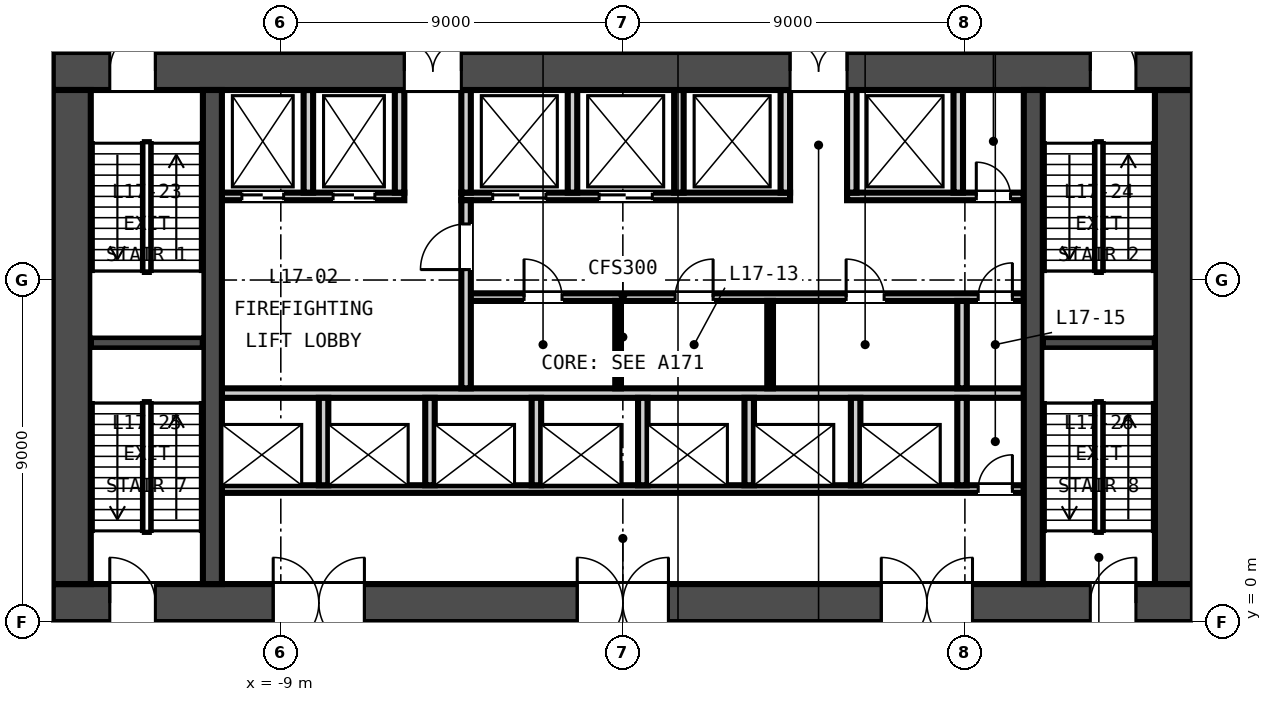
"""IFC4 building model, lengths in metres.
Left out: names, types, materials, properties, quantities, classifications, styles, units other than length and angle.
Written with IfcOpenShell. Run it as: python <this file> out.ifc"""

import sys

from ifc_helpers import new_model, si_unit, direction, frame, frame_2d, origin, place, context, subcontext, project, spatial, rectangle, extrude, element, fill, save


model = new_model("IFC4")
c1 = context("Model", 3, precision=1e-05, world=origin(), true_north=direction((0.0, 1.0)))
c2 = subcontext(c1, "Body", "Model", "MODEL_VIEW")
j1 = project(units=[si_unit("LENGTHUNIT", "METRE"), si_unit("PLANEANGLEUNIT", "RADIAN")], contexts=[c1])
p1 = place(None, origin())
s1 = spatial("IfcSite", under=j1, at=p1, CompositionType="ELEMENT")
p2 = place(p1, origin())
s2 = spatial("IfcBuilding", under=s1, at=p2, CompositionType="ELEMENT")
p3 = place(p2, frame((0.0, 0.0, 76.15)))
s3 = spatial("IfcBuildingStorey", under=s2, at=p3, CompositionType="ELEMENT", Elevation=76.15)
p4 = place(p3, frame((-15.0, 0.5, -0.3), z_axis=(0.0, 0.0, 1.0), x_axis=(1.0, 0.0, 0.0)))
e1 = element("IfcWall", 1, at=p4, inside=s3, PredefinedType="SOLIDWALL", context=c2, shape_type="SweptSolid", body=[
    extrude(rectangle(XDim=30.0, YDim=1.0, at=frame_2d((15.0, 0.0))), origin(), (0.0, 0.0, 1.0), 4.65),
])
p5 = place(p4, frame((5.8, 0.0, 0.3)))
e2 = element("IfcOpeningElement", 2, at=p5, cuts=e1, PredefinedType="OPENING", context=c2, shape_type="SweptSolid", body=[
    extrude(rectangle(XDim=2.4, YDim=2.4, at=frame_2d((1.2, 1.2))), frame((0.0, 0.51, 0.0), z_axis=(0.0, -1.0, 0.0), x_axis=(1.0, 0.0, 0.0)), (0.0, 0.0, 1.0), 1.02),
])
p6 = place(p4, frame((13.8, 0.0, 0.3)))
e3 = element("IfcOpeningElement", 3, at=p6, cuts=e1, PredefinedType="OPENING", context=c2, shape_type="SweptSolid", body=[
    extrude(rectangle(XDim=2.4, YDim=2.4, at=frame_2d((1.2, 1.2))), frame((0.0, 0.51, 0.0), z_axis=(0.0, -1.0, 0.0), x_axis=(1.0, 0.0, 0.0)), (0.0, 0.0, 1.0), 1.02),
])
p7 = place(p4, frame((21.8, 0.0, 0.3)))
e4 = element("IfcOpeningElement", 4, at=p7, cuts=e1, PredefinedType="OPENING", context=c2, shape_type="SweptSolid", body=[
    extrude(rectangle(XDim=2.4, YDim=2.4, at=frame_2d((1.2, 1.2))), frame((0.0, 0.51, 0.0), z_axis=(0.0, -1.0, 0.0), x_axis=(1.0, 0.0, 0.0)), (0.0, 0.0, 1.0), 1.02),
])
p8 = place(p4, frame((1.5, 0.0, 0.3)))
e5 = element("IfcOpeningElement", 5, at=p8, cuts=e1, PredefinedType="OPENING", context=c2, shape_type="SweptSolid", body=[
    extrude(rectangle(XDim=1.2, YDim=2.1, at=frame_2d((0.6, 1.05))), frame((0.0, 0.51, 0.0), z_axis=(0.0, -1.0, 0.0), x_axis=(1.0, 0.0, 0.0)), (0.0, 0.0, 1.0), 1.02),
])
p9 = place(p4, frame((27.3, 0.0, 0.3)))
e6 = element("IfcOpeningElement", 6, at=p9, cuts=e1, PredefinedType="OPENING", context=c2, shape_type="SweptSolid", body=[
    extrude(rectangle(XDim=1.2, YDim=2.1, at=frame_2d((0.6, 1.05))), frame((0.0, 0.51, 0.0), z_axis=(0.0, -1.0, 0.0), x_axis=(1.0, 0.0, 0.0)), (0.0, 0.0, 1.0), 1.02),
])
p10 = place(p3, frame((-15.0, 14.5, -0.3), z_axis=(0.0, 0.0, 1.0), x_axis=(1.0, 0.0, 0.0)))
e7 = element("IfcWall", 7, at=p10, inside=s3, PredefinedType="SOLIDWALL", context=c2, shape_type="SweptSolid", body=[
    extrude(rectangle(XDim=30.0, YDim=1.0, at=frame_2d((15.0, 0.0))), origin(), (0.0, 0.0, 1.0), 4.65),
])
p11 = place(p10, frame((9.25, 0.0, 0.3)))
e8 = element("IfcOpeningElement", 8, at=p11, cuts=e7, PredefinedType="OPENING", context=c2, shape_type="SweptSolid", body=[
    extrude(rectangle(XDim=1.5, YDim=2.1, at=frame_2d((0.75, 1.05))), frame((0.0, 0.51, 0.0), z_axis=(0.0, -1.0, 0.0), x_axis=(1.0, 0.0, 0.0)), (0.0, 0.0, 1.0), 1.02),
])
p12 = place(p10, frame((19.4, 0.0, 0.3)))
e9 = element("IfcOpeningElement", 9, at=p12, cuts=e7, PredefinedType="OPENING", context=c2, shape_type="SweptSolid", body=[
    extrude(rectangle(XDim=1.5, YDim=2.1, at=frame_2d((0.75, 1.05))), frame((0.0, 0.51, 0.0), z_axis=(0.0, -1.0, 0.0), x_axis=(1.0, 0.0, 0.0)), (0.0, 0.0, 1.0), 1.02),
])
p13 = place(p10, frame((1.5, 0.0, 0.3)))
e10 = element("IfcOpeningElement", 10, at=p13, cuts=e7, PredefinedType="OPENING", context=c2, shape_type="SweptSolid", body=[
    extrude(rectangle(XDim=1.2, YDim=2.1, at=frame_2d((0.6, 1.05))), frame((0.0, 0.51, 0.0), z_axis=(0.0, -1.0, 0.0), x_axis=(1.0, 0.0, 0.0)), (0.0, 0.0, 1.0), 1.02),
])
p14 = place(p10, frame((27.3, 0.0, 0.3)))
e11 = element("IfcOpeningElement", 11, at=p14, cuts=e7, PredefinedType="OPENING", context=c2, shape_type="SweptSolid", body=[
    extrude(rectangle(XDim=1.2, YDim=2.1, at=frame_2d((0.6, 1.05))), frame((0.0, 0.51, 0.0), z_axis=(0.0, -1.0, 0.0), x_axis=(1.0, 0.0, 0.0)), (0.0, 0.0, 1.0), 1.02),
])
for number, where, z_axis, x_axis in (
    (12, (-14.5, 1.0, -0.3), (0.0, 0.0, 1.0), (0.0, 1.0, 0.0)),
    (13, (14.5, 1.0, -0.3), (0.0, 0.0, 1.0), (0.0, 1.0, 0.0)),
):
    element("IfcWall", number, at=place(p3, frame(where, z_axis=z_axis, x_axis=x_axis)), inside=s3, PredefinedType="SOLIDWALL", context=c2, shape_type="SweptSolid", body=[
        extrude(rectangle(XDim=13.0, YDim=1.0, at=frame_2d((6.5, 0.0))), origin(), (0.0, 0.0, 1.0), 4.65),
    ])
for number, where, z_axis, x_axis in (
    (14, (-10.8, 1.0, -0.3), (0.0, 0.0, 1.0), (0.0, 1.0, 0.0)),
    (15, (10.8, 1.0, -0.3), (0.0, 0.0, 1.0), (0.0, 1.0, 0.0)),
):
    element("IfcWall", number, at=place(p3, frame(where, z_axis=z_axis, x_axis=x_axis)), inside=s3, PredefinedType="SOLIDWALL", context=c2, shape_type="SweptSolid", body=[
        extrude(rectangle(XDim=13.0, YDim=0.5, at=frame_2d((6.5, 0.0))), origin(), (0.0, 0.0, 1.0), 4.65),
    ])
p15 = place(p3, frame((-10.55, 3.5, 0.0), z_axis=(0.0, 0.0, 1.0), x_axis=(1.0, 0.0, 0.0)))
e16 = element("IfcWall", 16, at=p15, inside=s3, PredefinedType="PARTITIONING", context=c2, shape_type="SweptSolid", body=[
    extrude(rectangle(XDim=21.1, YDim=0.2, at=frame_2d((10.55, 0.0))), origin(), (0.0, 0.0, 1.0), 4.35),
])
p16 = place(p15, frame((19.9, 0.0, 0.0)))
e17 = element("IfcOpeningElement", 17, at=p16, cuts=e16, PredefinedType="OPENING", context=c2, shape_type="SweptSolid", body=[
    extrude(rectangle(XDim=0.9, YDim=2.1, at=frame_2d((0.45, 1.05))), frame((0.0, 0.11, 0.0), z_axis=(0.0, -1.0, 0.0), x_axis=(1.0, 0.0, 0.0)), (0.0, 0.0, 1.0), 0.22),
])
p17 = place(p3, frame((-10.55, 6.025, 0.0), z_axis=(0.0, 0.0, 1.0), x_axis=(1.0, 0.0, 0.0)))
e18 = element("IfcWall", 18, at=p17, inside=s3, PredefinedType="PARTITIONING", context=c2, shape_type="SweptSolid", body=[
    extrude(rectangle(XDim=21.1, YDim=0.25, at=frame_2d((10.55, 0.0))), origin(), (0.0, 0.0, 1.0), 4.35),
])
p18 = place(p3, frame((-4.125, 8.55, 0.0), z_axis=(0.0, 0.0, 1.0), x_axis=(1.0, 0.0, 0.0)))
e19 = element("IfcWall", 19, at=p18, inside=s3, PredefinedType="PARTITIONING", context=c2, shape_type="SweptSolid", body=[
    extrude(rectangle(XDim=14.675, YDim=0.2, at=frame_2d((7.337, 0.0))), origin(), (0.0, 0.0, 1.0), 4.35),
])
p19 = place(p18, frame((1.525, 0.0, 0.0)))
e20 = element("IfcOpeningElement", 20, at=p19, cuts=e19, PredefinedType="OPENING", context=c2, shape_type="SweptSolid", body=[
    extrude(rectangle(XDim=1.0, YDim=2.1, at=frame_2d((0.5, 1.05))), frame((0.0, 0.11, 0.0), z_axis=(0.0, -1.0, 0.0), x_axis=(1.0, 0.0, 0.0)), (0.0, 0.0, 1.0), 0.22),
])
p20 = place(p18, frame((5.5, 0.0, 0.0)))
e21 = element("IfcOpeningElement", 21, at=p20, cuts=e19, PredefinedType="OPENING", context=c2, shape_type="SweptSolid", body=[
    extrude(rectangle(XDim=1.0, YDim=2.1, at=frame_2d((0.5, 1.05))), frame((0.0, 0.11, 0.0), z_axis=(0.0, -1.0, 0.0), x_axis=(1.0, 0.0, 0.0)), (0.0, 0.0, 1.0), 0.22),
])
p21 = place(p18, frame((10.0, 0.0, 0.0)))
e22 = element("IfcOpeningElement", 22, at=p21, cuts=e19, PredefinedType="OPENING", context=c2, shape_type="SweptSolid", body=[
    extrude(rectangle(XDim=1.0, YDim=2.1, at=frame_2d((0.5, 1.05))), frame((0.0, 0.11, 0.0), z_axis=(0.0, -1.0, 0.0), x_axis=(1.0, 0.0, 0.0)), (0.0, 0.0, 1.0), 0.22),
])
p22 = place(p18, frame((13.475, 0.0, 0.0)))
e23 = element("IfcOpeningElement", 23, at=p22, cuts=e19, PredefinedType="OPENING", context=c2, shape_type="SweptSolid", body=[
    extrude(rectangle(XDim=0.9, YDim=2.1, at=frame_2d((0.45, 1.05))), frame((0.0, 0.11, 0.0), z_axis=(0.0, -1.0, 0.0), x_axis=(1.0, 0.0, 0.0)), (0.0, 0.0, 1.0), 0.22),
])
p23 = place(p3, frame((-10.55, 11.2, 0.0), z_axis=(0.0, 0.0, 1.0), x_axis=(1.0, 0.0, 0.0)))
e24 = element("IfcWall", 24, at=p23, inside=s3, PredefinedType="PARTITIONING", context=c2, shape_type="SweptSolid", body=[
    extrude(rectangle(XDim=4.8, YDim=0.2, at=frame_2d((2.4, 0.0))), origin(), (0.0, 0.0, 1.0), 4.35),
])
p24 = place(p23, frame((0.525, 0.0, 0.0)))
e25 = element("IfcOpeningElement", 25, at=p24, cuts=e24, PredefinedType="OPENING", context=c2, shape_type="SweptSolid", body=[
    extrude(rectangle(XDim=1.1, YDim=2.1, at=frame_2d((0.55, 1.05))), frame((0.0, 0.11, 0.0), z_axis=(0.0, -1.0, 0.0), x_axis=(1.0, 0.0, 0.0)), (0.0, 0.0, 1.0), 0.22),
])
p25 = place(p23, frame((2.925, 0.0, 0.0)))
e26 = element("IfcOpeningElement", 26, at=p25, cuts=e24, PredefinedType="OPENING", context=c2, shape_type="SweptSolid", body=[
    extrude(rectangle(XDim=1.1, YDim=2.1, at=frame_2d((0.55, 1.05))), frame((0.0, 0.11, 0.0), z_axis=(0.0, -1.0, 0.0), x_axis=(1.0, 0.0, 0.0)), (0.0, 0.0, 1.0), 0.22),
])
p26 = place(p3, frame((-4.25, 11.2, 0.0), z_axis=(0.0, 0.0, 1.0), x_axis=(1.0, 0.0, 0.0)))
e27 = element("IfcWall", 27, at=p26, inside=s3, PredefinedType="PARTITIONING", context=c2, shape_type="SweptSolid", body=[
    extrude(rectangle(XDim=8.65, YDim=0.2, at=frame_2d((4.325, 0.0))), origin(), (0.0, 0.0, 1.0), 4.35),
])
p27 = place(p26, frame((0.825, 0.0, 0.0)))
e28 = element("IfcOpeningElement", 28, at=p27, cuts=e27, PredefinedType="OPENING", context=c2, shape_type="SweptSolid", body=[
    extrude(rectangle(XDim=1.4, YDim=2.1, at=frame_2d((0.7, 1.05))), frame((0.0, 0.11, 0.0), z_axis=(0.0, -1.0, 0.0), x_axis=(1.0, 0.0, 0.0)), (0.0, 0.0, 1.0), 0.22),
])
p28 = place(p26, frame((3.625, 0.0, 0.0)))
e29 = element("IfcOpeningElement", 29, at=p28, cuts=e27, PredefinedType="OPENING", context=c2, shape_type="SweptSolid", body=[
    extrude(rectangle(XDim=1.4, YDim=2.1, at=frame_2d((0.7, 1.05))), frame((0.0, 0.11, 0.0), z_axis=(0.0, -1.0, 0.0), x_axis=(1.0, 0.0, 0.0)), (0.0, 0.0, 1.0), 0.22),
])
p29 = place(p3, frame((5.9, 11.2, 0.0), z_axis=(0.0, 0.0, 1.0), x_axis=(1.0, 0.0, 0.0)))
e30 = element("IfcWall", 30, at=p29, inside=s3, PredefinedType="PARTITIONING", context=c2, shape_type="SweptSolid", body=[
    extrude(rectangle(XDim=4.65, YDim=0.2, at=frame_2d((2.325, 0.0))), origin(), (0.0, 0.0, 1.0), 4.35),
])
p30 = place(p29, frame((3.4, 0.0, 0.0)))
e31 = element("IfcOpeningElement", 31, at=p30, cuts=e30, PredefinedType="OPENING", context=c2, shape_type="SweptSolid", body=[
    extrude(rectangle(XDim=0.9, YDim=2.1, at=frame_2d((0.45, 1.05))), frame((0.0, 0.11, 0.0), z_axis=(0.0, -1.0, 0.0), x_axis=(1.0, 0.0, 0.0)), (0.0, 0.0, 1.0), 0.22),
])
p31 = place(p3, frame((-4.125, 6.15, 0.0), z_axis=(0.0, 0.0, 1.0), x_axis=(0.0, 1.0, 0.0)))
e32 = element("IfcWall", 32, at=p31, inside=s3, PredefinedType="PARTITIONING", context=c2, shape_type="SweptSolid", body=[
    extrude(rectangle(XDim=4.95, YDim=0.25, at=frame_2d((2.475, 0.0))), origin(), (0.0, 0.0, 1.0), 4.35),
])
p32 = place(p31, frame((3.125, 0.0, 0.0)))
e33 = element("IfcOpeningElement", 33, at=p32, cuts=e32, PredefinedType="OPENING", context=c2, shape_type="SweptSolid", body=[
    extrude(rectangle(XDim=1.2, YDim=2.1, at=frame_2d((0.6, 1.05))), frame((0.0, 0.135, 0.0), z_axis=(0.0, -1.0, 0.0), x_axis=(1.0, 0.0, 0.0)), (0.0, 0.0, 1.0), 0.27),
])
for number, where, z_axis, x_axis in (
    (34, (-7.875, 3.6, 0.0), (0.0, 0.0, 1.0), (0.0, 1.0, 0.0)),
    (35, (-5.075, 3.6, 0.0), (0.0, 0.0, 1.0), (0.0, 1.0, 0.0)),
    (36, (-2.275, 3.6, 0.0), (0.0, 0.0, 1.0), (0.0, 1.0, 0.0)),
    (37, (0.525, 3.6, 0.0), (0.0, 0.0, 1.0), (0.0, 1.0, 0.0)),
    (38, (3.325, 3.6, 0.0), (0.0, 0.0, 1.0), (0.0, 1.0, 0.0)),
    (39, (6.125, 3.6, 0.0), (0.0, 0.0, 1.0), (0.0, 1.0, 0.0)),
    (40, (8.925, 3.6, 0.0), (0.0, 0.0, 1.0), (0.0, 1.0, 0.0)),
):
    element("IfcWall", number, at=place(p3, frame(where, z_axis=z_axis, x_axis=x_axis)), inside=s3, PredefinedType="PARTITIONING", context=c2, shape_type="SweptSolid", body=[
        extrude(rectangle(XDim=2.3, YDim=0.25, at=frame_2d((1.15, 0.0))), origin(), (0.0, 0.0, 1.0), 4.35),
    ])
for number, where, z_axis, x_axis in (
    (41, (-0.125, 6.15, 0.0), (0.0, 0.0, 1.0), (0.0, 1.0, 0.0)),
    (42, (3.875, 6.15, 0.0), (0.0, 0.0, 1.0), (0.0, 1.0, 0.0)),
):
    element("IfcWall", number, at=place(p3, frame(where, z_axis=z_axis, x_axis=x_axis)), inside=s3, PredefinedType="PARTITIONING", context=c2, shape_type="SweptSolid", body=[
        extrude(rectangle(XDim=2.3, YDim=0.15, at=frame_2d((1.15, 0.0))), origin(), (0.0, 0.0, 1.0), 4.35),
    ])
p33 = place(p3, frame((8.925, 6.15, 0.0), z_axis=(0.0, 0.0, 1.0), x_axis=(0.0, 1.0, 0.0)))
e43 = element("IfcWall", 43, at=p33, inside=s3, PredefinedType="PARTITIONING", context=c2, shape_type="SweptSolid", body=[
    extrude(rectangle(XDim=2.3, YDim=0.25, at=frame_2d((1.15, 0.0))), origin(), (0.0, 0.0, 1.0), 4.35),
])
for number, where, z_axis, x_axis in (
    (44, (-8.275, 11.3, 0.0), (0.0, 0.0, 1.0), (0.0, 1.0, 0.0)),
    (45, (-5.875, 11.3, 0.0), (0.0, 0.0, 1.0), (0.0, 1.0, 0.0)),
    (46, (-4.125, 11.3, 0.0), (0.0, 0.0, 1.0), (0.0, 1.0, 0.0)),
    (47, (-1.325, 11.3, 0.0), (0.0, 0.0, 1.0), (0.0, 1.0, 0.0)),
    (48, (1.475, 11.3, 0.0), (0.0, 0.0, 1.0), (0.0, 1.0, 0.0)),
    (49, (4.275, 11.3, 0.0), (0.0, 0.0, 1.0), (0.0, 1.0, 0.0)),
    (50, (6.025, 11.3, 0.0), (0.0, 0.0, 1.0), (0.0, 1.0, 0.0)),
    (51, (8.825, 11.3, 0.0), (0.0, 0.0, 1.0), (0.0, 1.0, 0.0)),
):
    element("IfcWall", number, at=place(p3, frame(where, z_axis=z_axis, x_axis=x_axis)), inside=s3, PredefinedType="PARTITIONING", context=c2, shape_type="SweptSolid", body=[
        extrude(rectangle(XDim=2.7, YDim=0.25, at=frame_2d((1.35, 0.0))), origin(), (0.0, 0.0, 1.0), 4.35),
    ])
for number, where, z_axis, x_axis in (
    (52, (-14.0, 7.35, -0.3), (0.0, 0.0, 1.0), (1.0, 0.0, 0.0)),
    (53, (11.05, 7.35, -0.3), (0.0, 0.0, 1.0), (1.0, 0.0, 0.0)),
):
    element("IfcWall", number, at=place(p3, frame(where, z_axis=z_axis, x_axis=x_axis)), inside=s3, PredefinedType="SOLIDWALL", context=c2, shape_type="SweptSolid", body=[
        extrude(rectangle(XDim=2.95, YDim=0.3, at=frame_2d((1.475, 0.0))), origin(), (0.0, 0.0, 1.0), 4.65),
    ])
p34 = place(p32, origin())
e54 = element("IfcDoor", 54, at=p34, inside=s3, OperationType="SINGLE_SWING_LEFT", PredefinedType="DOOR", context=c2, shape_type="SweptSolid", body=[
    extrude(rectangle(XDim=1.2, YDim=2.1, at=frame_2d((0.6, 1.05))), frame((0.0, 0.025, 0.0), z_axis=(0.0, -1.0, 0.0), x_axis=(1.0, 0.0, 0.0)), (0.0, 0.0, 1.0), 0.05),
])
fill(e33, e54)
p35 = place(p16, origin())
e55 = element("IfcDoor", 55, at=p35, inside=s3, OperationType="SINGLE_SWING_RIGHT", PredefinedType="DOOR", context=c2, shape_type="SweptSolid", body=[
    extrude(rectangle(XDim=0.9, YDim=2.1, at=frame_2d((0.45, 1.05))), frame((0.0, 0.025, 0.0), z_axis=(0.0, -1.0, 0.0), x_axis=(1.0, 0.0, 0.0)), (0.0, 0.0, 1.0), 0.05),
])
fill(e17, e55)
p36 = place(p19, origin())
e56 = element("IfcDoor", 56, at=p36, inside=s3, OperationType="SINGLE_SWING_LEFT", PredefinedType="DOOR", context=c2, shape_type="SweptSolid", body=[
    extrude(rectangle(XDim=1.0, YDim=2.1, at=frame_2d((0.5, 1.05))), frame((0.0, 0.025, 0.0), z_axis=(0.0, -1.0, 0.0), x_axis=(1.0, 0.0, 0.0)), (0.0, 0.0, 1.0), 0.05),
])
fill(e20, e56)
p37 = place(p20, origin())
e57 = element("IfcDoor", 57, at=p37, inside=s3, OperationType="SINGLE_SWING_RIGHT", PredefinedType="DOOR", context=c2, shape_type="SweptSolid", body=[
    extrude(rectangle(XDim=1.0, YDim=2.1, at=frame_2d((0.5, 1.05))), frame((0.0, 0.025, 0.0), z_axis=(0.0, -1.0, 0.0), x_axis=(1.0, 0.0, 0.0)), (0.0, 0.0, 1.0), 0.05),
])
fill(e21, e57)
p38 = place(p21, origin())
e58 = element("IfcDoor", 58, at=p38, inside=s3, OperationType="SINGLE_SWING_LEFT", PredefinedType="DOOR", context=c2, shape_type="SweptSolid", body=[
    extrude(rectangle(XDim=1.0, YDim=2.1, at=frame_2d((0.5, 1.05))), frame((0.0, 0.025, 0.0), z_axis=(0.0, -1.0, 0.0), x_axis=(1.0, 0.0, 0.0)), (0.0, 0.0, 1.0), 0.05),
])
fill(e22, e58)
p39 = place(p22, origin())
e59 = element("IfcDoor", 59, at=p39, inside=s3, OperationType="SINGLE_SWING_RIGHT", PredefinedType="DOOR", context=c2, shape_type="SweptSolid", body=[
    extrude(rectangle(XDim=0.9, YDim=2.1, at=frame_2d((0.45, 1.05))), frame((0.0, 0.025, 0.0), z_axis=(0.0, -1.0, 0.0), x_axis=(1.0, 0.0, 0.0)), (0.0, 0.0, 1.0), 0.05),
])
fill(e23, e59)
p40 = place(p24, origin())
e60 = element("IfcDoor", 60, at=p40, inside=s3, OperationType="DOUBLE_DOOR_SLIDING", PredefinedType="DOOR", context=c2, shape_type="SweptSolid", body=[
    extrude(rectangle(XDim=1.1, YDim=2.1, at=frame_2d((0.55, 1.05))), frame((0.0, 0.025, 0.0), z_axis=(0.0, -1.0, 0.0), x_axis=(1.0, 0.0, 0.0)), (0.0, 0.0, 1.0), 0.05),
])
fill(e25, e60)
p41 = place(p25, origin())
e61 = element("IfcDoor", 61, at=p41, inside=s3, OperationType="DOUBLE_DOOR_SLIDING", PredefinedType="DOOR", context=c2, shape_type="SweptSolid", body=[
    extrude(rectangle(XDim=1.1, YDim=2.1, at=frame_2d((0.55, 1.05))), frame((0.0, 0.025, 0.0), z_axis=(0.0, -1.0, 0.0), x_axis=(1.0, 0.0, 0.0)), (0.0, 0.0, 1.0), 0.05),
])
fill(e26, e61)
p42 = place(p27, origin())
e62 = element("IfcDoor", 62, at=p42, inside=s3, OperationType="DOUBLE_DOOR_SLIDING", PredefinedType="DOOR", context=c2, shape_type="SweptSolid", body=[
    extrude(rectangle(XDim=1.4, YDim=2.1, at=frame_2d((0.7, 1.05))), frame((0.0, 0.025, 0.0), z_axis=(0.0, -1.0, 0.0), x_axis=(1.0, 0.0, 0.0)), (0.0, 0.0, 1.0), 0.05),
])
fill(e28, e62)
p43 = place(p28, origin())
e63 = element("IfcDoor", 63, at=p43, inside=s3, OperationType="DOUBLE_DOOR_SLIDING", PredefinedType="DOOR", context=c2, shape_type="SweptSolid", body=[
    extrude(rectangle(XDim=1.4, YDim=2.1, at=frame_2d((0.7, 1.05))), frame((0.0, 0.025, 0.0), z_axis=(0.0, -1.0, 0.0), x_axis=(1.0, 0.0, 0.0)), (0.0, 0.0, 1.0), 0.05),
])
fill(e29, e63)
p44 = place(p30, origin())
e64 = element("IfcDoor", 64, at=p44, inside=s3, OperationType="SINGLE_SWING_LEFT", PredefinedType="DOOR", context=c2, shape_type="SweptSolid", body=[
    extrude(rectangle(XDim=0.9, YDim=2.1, at=frame_2d((0.45, 1.05))), frame((0.0, 0.025, 0.0), z_axis=(0.0, -1.0, 0.0), x_axis=(1.0, 0.0, 0.0)), (0.0, 0.0, 1.0), 0.05),
])
fill(e31, e64)
p45 = place(p5, origin())
e65 = element("IfcDoor", 65, at=p45, inside=s3, OperationType="DOUBLE_DOOR_DOUBLE_SWING", PredefinedType="DOOR", context=c2, shape_type="SweptSolid", body=[
    extrude(rectangle(XDim=2.4, YDim=2.4, at=frame_2d((1.2, 1.2))), frame((0.0, 0.025, 0.0), z_axis=(0.0, -1.0, 0.0), x_axis=(1.0, 0.0, 0.0)), (0.0, 0.0, 1.0), 0.05),
])
fill(e2, e65)
p46 = place(p6, origin())
e66 = element("IfcDoor", 66, at=p46, inside=s3, OperationType="DOUBLE_DOOR_DOUBLE_SWING", PredefinedType="DOOR", context=c2, shape_type="SweptSolid", body=[
    extrude(rectangle(XDim=2.4, YDim=2.4, at=frame_2d((1.2, 1.2))), frame((0.0, 0.025, 0.0), z_axis=(0.0, -1.0, 0.0), x_axis=(1.0, 0.0, 0.0)), (0.0, 0.0, 1.0), 0.05),
])
fill(e3, e66)
p47 = place(p7, origin())
e67 = element("IfcDoor", 67, at=p47, inside=s3, OperationType="DOUBLE_DOOR_DOUBLE_SWING", PredefinedType="DOOR", context=c2, shape_type="SweptSolid", body=[
    extrude(rectangle(XDim=2.4, YDim=2.4, at=frame_2d((1.2, 1.2))), frame((0.0, 0.025, 0.0), z_axis=(0.0, -1.0, 0.0), x_axis=(1.0, 0.0, 0.0)), (0.0, 0.0, 1.0), 0.05),
])
fill(e4, e67)
p48 = place(p11, origin())
e68 = element("IfcDoor", 68, at=p48, inside=s3, OperationType="DOUBLE_DOOR_SINGLE_SWING", PredefinedType="DOOR", context=c2, shape_type="SweptSolid", body=[
    extrude(rectangle(XDim=1.5, YDim=2.1, at=frame_2d((0.75, 1.05))), frame((0.0, 0.025, 0.0), z_axis=(0.0, -1.0, 0.0), x_axis=(1.0, 0.0, 0.0)), (0.0, 0.0, 1.0), 0.05),
])
fill(e8, e68)
p49 = place(p12, origin())
e69 = element("IfcDoor", 69, at=p49, inside=s3, OperationType="DOUBLE_DOOR_SINGLE_SWING", PredefinedType="DOOR", context=c2, shape_type="SweptSolid", body=[
    extrude(rectangle(XDim=1.5, YDim=2.1, at=frame_2d((0.75, 1.05))), frame((0.0, 0.025, 0.0), z_axis=(0.0, -1.0, 0.0), x_axis=(1.0, 0.0, 0.0)), (0.0, 0.0, 1.0), 0.05),
])
fill(e9, e69)
p50 = place(p13, origin())
e70 = element("IfcDoor", 70, at=p50, inside=s3, OperationType="SINGLE_SWING_RIGHT", PredefinedType="DOOR", context=c2, shape_type="SweptSolid", body=[
    extrude(rectangle(XDim=1.2, YDim=2.1, at=frame_2d((0.6, 1.05))), frame((0.0, 0.025, 0.0), z_axis=(0.0, -1.0, 0.0), x_axis=(1.0, 0.0, 0.0)), (0.0, 0.0, 1.0), 0.05),
])
fill(e10, e70)
p51 = place(p14, origin())
e71 = element("IfcDoor", 71, at=p51, inside=s3, OperationType="SINGLE_SWING_LEFT", PredefinedType="DOOR", context=c2, shape_type="SweptSolid", body=[
    extrude(rectangle(XDim=1.2, YDim=2.1, at=frame_2d((0.6, 1.05))), frame((0.0, 0.025, 0.0), z_axis=(0.0, -1.0, 0.0), x_axis=(1.0, 0.0, 0.0)), (0.0, 0.0, 1.0), 0.05),
])
fill(e11, e71)
p52 = place(p8, origin())
e72 = element("IfcDoor", 72, at=p52, inside=s3, OperationType="SINGLE_SWING_LEFT", PredefinedType="DOOR", context=c2, shape_type="SweptSolid", body=[
    extrude(rectangle(XDim=1.2, YDim=2.1, at=frame_2d((0.6, 1.05))), frame((0.0, 0.025, 0.0), z_axis=(0.0, -1.0, 0.0), x_axis=(1.0, 0.0, 0.0)), (0.0, 0.0, 1.0), 0.05),
])
fill(e5, e72)
p53 = place(p9, origin())
e73 = element("IfcDoor", 73, at=p53, inside=s3, OperationType="SINGLE_SWING_RIGHT", PredefinedType="DOOR", context=c2, shape_type="SweptSolid", body=[
    extrude(rectangle(XDim=1.2, YDim=2.1, at=frame_2d((0.6, 1.05))), frame((0.0, 0.025, 0.0), z_axis=(0.0, -1.0, 0.0), x_axis=(1.0, 0.0, 0.0)), (0.0, 0.0, 1.0), 0.05),
])
fill(e6, e73)
save(model, sys.argv[1])
